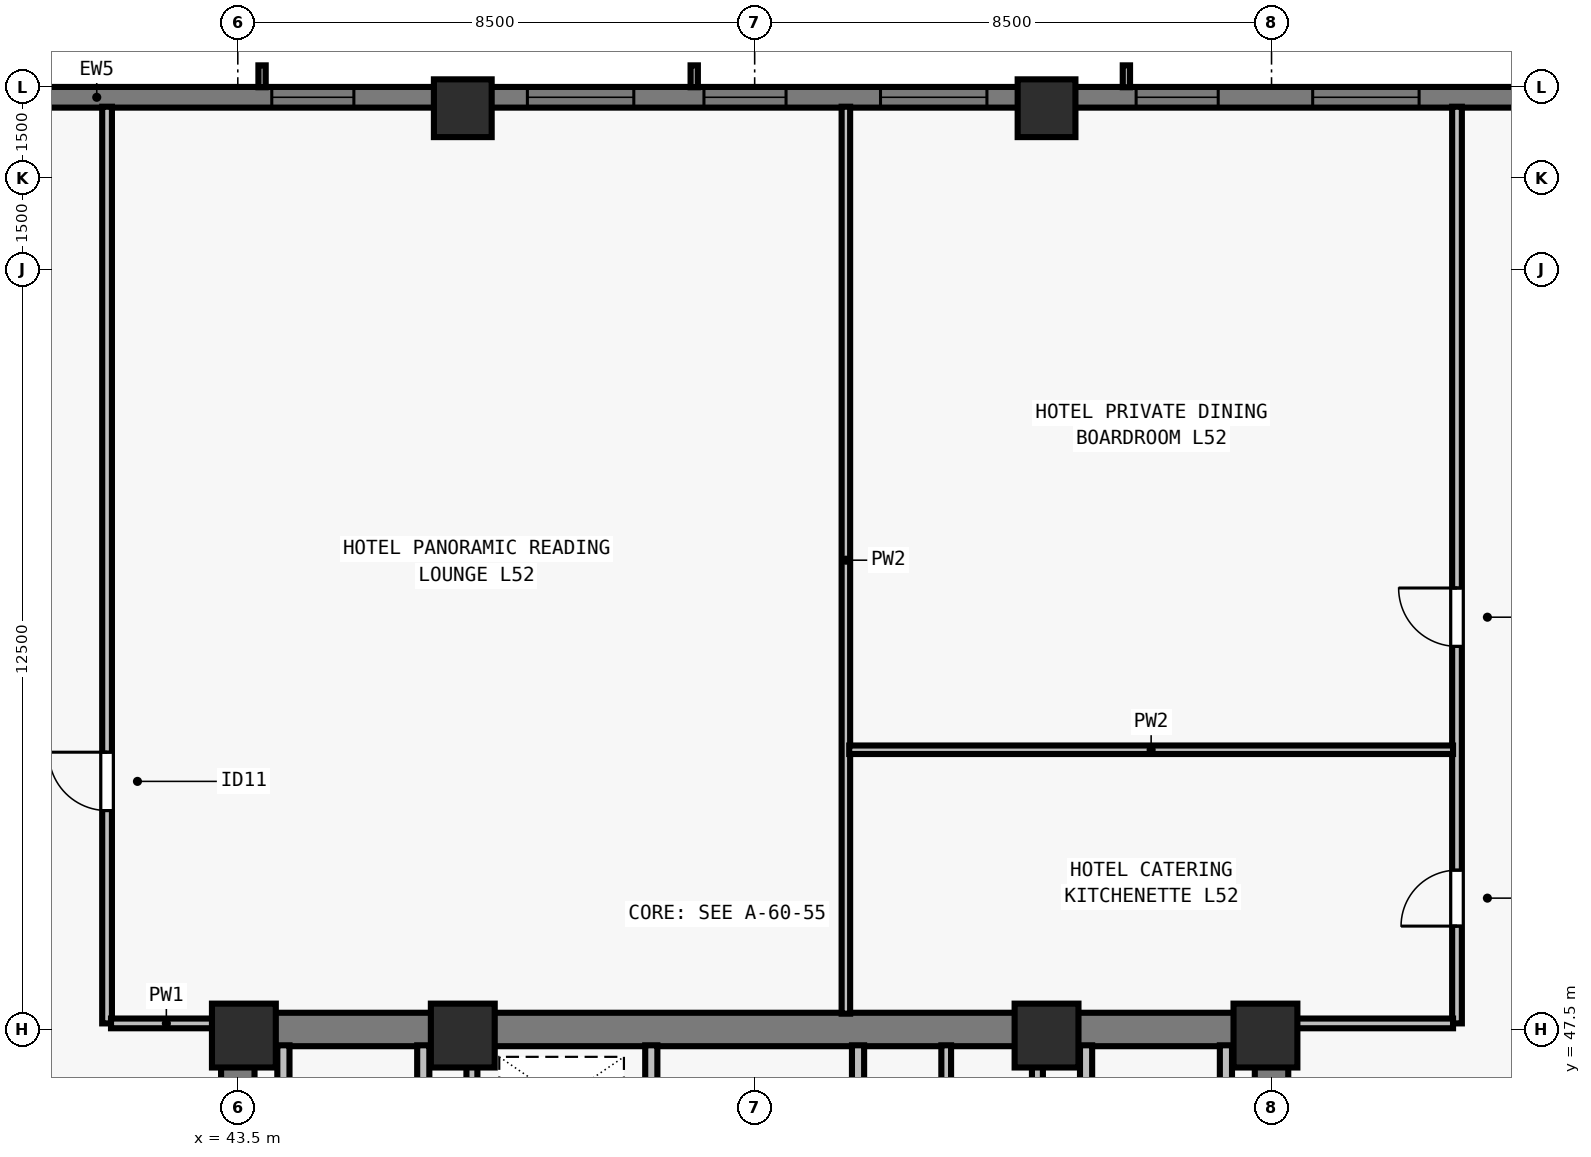
"""IFC4 building model, lengths in metres.
Left out: names, types, materials, properties, quantities, classifications, styles, units other than length and angle.
Written with IfcOpenShell. Run it as: python <this file> out.ifc"""

import sys

from ifc_helpers import new_model, si_unit, direction, frame, frame_2d, origin, origin_2d, place, context, subcontext, project, spatial, rectangle, extrude, element, fill, save


model = new_model("IFC4")
c1 = context("Model", 3, precision=1e-05, world=origin(), true_north=direction((0.0, 1.0)))
c2 = subcontext(c1, "Body", "Model", "MODEL_VIEW")
j1 = project(units=[si_unit("LENGTHUNIT", "METRE"), si_unit("PLANEANGLEUNIT", "RADIAN")], contexts=[c1])
p1 = place(None, origin())
s1 = spatial("IfcSite", under=j1, at=p1, CompositionType="ELEMENT")
p2 = place(p1, origin())
s2 = spatial("IfcBuilding", under=s1, at=p2, CompositionType="ELEMENT")
p3 = place(p2, frame((0.0, 0.0, 190.0)))
s3 = spatial("IfcBuildingStorey", under=s2, at=p3, CompositionType="ELEMENT", Elevation=190.0)
for number, where, z_axis, x_axis in (
    (1, (43.6, 47.4, 0.0), (0.0, 0.0, 1.0), (1.0, 0.0, 0.0)),
    (2, (47.2, 47.4, 0.0), (0.0, 0.0, 1.0), (1.0, 0.0, 0.0)),
    (3, (56.8, 47.4, 0.0), (0.0, 0.0, 1.0), (1.0, 0.0, 0.0)),
    (4, (60.4, 47.4, 0.0), (0.0, 0.0, 1.0), (1.0, 0.0, 0.0)),
):
    element("IfcColumn", number, at=place(p3, frame(where, z_axis=z_axis, x_axis=x_axis)), inside=s3, PredefinedType="COLUMN", context=c2, shape_type="SweptSolid", body=[
        extrude(rectangle(XDim=1.05, YDim=1.05, at=origin_2d()), origin(), (0.0, 0.0, 1.0), 3.5),
    ])
for number, where, z_axis, x_axis in (
    (5, (56.8, 62.65, 0.0), (0.0, 0.0, 1.0), (1.0, 0.0, 0.0)),
    (6, (47.2, 62.65, 0.0), (0.0, 0.0, 1.0), (1.0, 0.0, 0.0)),
):
    element("IfcColumn", number, at=place(p3, frame(where, z_axis=z_axis, x_axis=x_axis)), inside=s3, PredefinedType="COLUMN", context=c2, shape_type="SweptSolid", body=[
        extrude(rectangle(XDim=0.95, YDim=0.95, at=origin_2d()), origin(), (0.0, 0.0, 1.0), 3.5),
    ])
p4 = place(p3, frame((32.0, 62.83, 0.0), z_axis=(0.0, 0.0, 1.0), x_axis=(1.0, 0.0, 0.0)))
e7 = element("IfcWall", 7, at=p4, inside=s3, PredefinedType="SOLIDWALL", context=c2, shape_type="SweptSolid", body=[
    extrude(rectangle(XDim=39.682, YDim=0.34, at=frame_2d((19.841, 0.0))), origin(), (0.0, 0.0, 1.0), 3.24),
])
p5 = place(p4, frame((4.952, 0.0, 0.8)))
e8 = element("IfcOpeningElement", 8, at=p5, cuts=e7, PredefinedType="OPENING", context=c2, shape_type="SweptSolid", body=[
    extrude(rectangle(XDim=1.35, YDim=1.62, at=frame_2d((0.675, 0.81))), frame((0.0, 0.18, 0.0), z_axis=(0.0, -1.0, 0.0), x_axis=(1.0, 0.0, 0.0)), (0.0, 0.0, 1.0), 0.36),
])
p6 = place(p4, frame((12.059, 0.0, 0.8)))
e9 = element("IfcOpeningElement", 9, at=p6, cuts=e7, PredefinedType="OPENING", context=c2, shape_type="SweptSolid", body=[
    extrude(rectangle(XDim=1.35, YDim=1.62, at=frame_2d((0.675, 0.81))), frame((0.0, 0.18, 0.0), z_axis=(0.0, -1.0, 0.0), x_axis=(1.0, 0.0, 0.0)), (0.0, 0.0, 1.0), 0.36),
])
p7 = place(p4, frame((16.262, 0.0, 0.8)))
e10 = element("IfcOpeningElement", 10, at=p7, cuts=e7, PredefinedType="OPENING", context=c2, shape_type="SweptSolid", body=[
    extrude(rectangle(XDim=1.75, YDim=1.62, at=frame_2d((0.875, 0.81))), frame((0.0, 0.18, 0.0), z_axis=(0.0, -1.0, 0.0), x_axis=(1.0, 0.0, 0.0)), (0.0, 0.0, 1.0), 0.36),
])
p8 = place(p4, frame((19.166, 0.0, 0.8)))
e11 = element("IfcOpeningElement", 11, at=p8, cuts=e7, PredefinedType="OPENING", context=c2, shape_type="SweptSolid", body=[
    extrude(rectangle(XDim=1.35, YDim=1.62, at=frame_2d((0.675, 0.81))), frame((0.0, 0.18, 0.0), z_axis=(0.0, -1.0, 0.0), x_axis=(1.0, 0.0, 0.0)), (0.0, 0.0, 1.0), 0.36),
])
p9 = place(p4, frame((22.07, 0.0, 0.8)))
e12 = element("IfcOpeningElement", 12, at=p9, cuts=e7, PredefinedType="OPENING", context=c2, shape_type="SweptSolid", body=[
    extrude(rectangle(XDim=1.75, YDim=1.62, at=frame_2d((0.875, 0.81))), frame((0.0, 0.18, 0.0), z_axis=(0.0, -1.0, 0.0), x_axis=(1.0, 0.0, 0.0)), (0.0, 0.0, 1.0), 0.36),
])
p10 = place(p4, frame((26.273, 0.0, 0.8)))
e13 = element("IfcOpeningElement", 13, at=p10, cuts=e7, PredefinedType="OPENING", context=c2, shape_type="SweptSolid", body=[
    extrude(rectangle(XDim=1.35, YDim=1.62, at=frame_2d((0.675, 0.81))), frame((0.0, 0.18, 0.0), z_axis=(0.0, -1.0, 0.0), x_axis=(1.0, 0.0, 0.0)), (0.0, 0.0, 1.0), 0.36),
])
p11 = place(p4, frame((29.177, 0.0, 0.8)))
e14 = element("IfcOpeningElement", 14, at=p11, cuts=e7, PredefinedType="OPENING", context=c2, shape_type="SweptSolid", body=[
    extrude(rectangle(XDim=1.75, YDim=1.62, at=frame_2d((0.875, 0.81))), frame((0.0, 0.18, 0.0), z_axis=(0.0, -1.0, 0.0), x_axis=(1.0, 0.0, 0.0)), (0.0, 0.0, 1.0), 0.36),
])
p12 = place(p4, frame((34.23, 0.0, 0.8)))
e15 = element("IfcOpeningElement", 15, at=p12, cuts=e7, PredefinedType="OPENING", context=c2, shape_type="SweptSolid", body=[
    extrude(rectangle(XDim=1.35, YDim=1.62, at=frame_2d((0.675, 0.81))), frame((0.0, 0.18, 0.0), z_axis=(0.0, -1.0, 0.0), x_axis=(1.0, 0.0, 0.0)), (0.0, 0.0, 1.0), 0.36),
])
p13 = place(p3, frame((43.225, 47.5, 0.0), z_axis=(0.0, 0.0, 1.0), x_axis=(1.0, 0.0, 0.0)))
e16 = element("IfcWall", 16, at=p13, inside=s3, PredefinedType="SHEAR", context=c2, shape_type="SweptSolid", body=[
    extrude(rectangle(XDim=17.55, YDim=0.55, at=frame_2d((8.775, 0.0))), origin(), (0.0, 0.0, 1.0), 3.24),
])
for number, where, z_axis, x_axis in (
    (17, (43.5, 40.8, 0.0), (0.0, 0.0, 1.0), (0.0, 1.0, 0.0)),
    (18, (60.5, 40.8, 0.0), (0.0, 0.0, 1.0), (0.0, 1.0, 0.0)),
):
    element("IfcWall", number, at=place(p3, frame(where, z_axis=z_axis, x_axis=x_axis)), inside=s3, PredefinedType="SHEAR", context=c2, shape_type="SweptSolid", body=[
        extrude(rectangle(XDim=6.435, YDim=0.55, at=frame_2d((3.218, 0.0))), origin(), (0.0, 0.0, 1.0), 3.24),
    ])
p14 = place(p3, frame((50.3, 40.585, 0.0), z_axis=(0.0, 0.0, 1.0), x_axis=(0.0, 1.0, 0.0)))
e19 = element("IfcWall", 19, at=p14, inside=s3, PredefinedType="SOLIDWALL", context=c2, shape_type="SweptSolid", body=[
    extrude(rectangle(XDim=6.655, YDim=0.2, at=frame_2d((3.328, 0.0))), origin(), (0.0, 0.0, 1.0), 3.24),
])
p15 = place(p14, frame((5.065, 0.0, 0.0)))
e20 = element("IfcOpeningElement", 20, at=p15, cuts=e19, PredefinedType="OPENING", context=c2, shape_type="SweptSolid", body=[
    extrude(rectangle(XDim=0.8, YDim=2.08, at=frame_2d((0.4, 1.04))), frame((0.0, 0.11, 0.0), z_axis=(0.0, -1.0, 0.0), x_axis=(1.0, 0.0, 0.0)), (0.0, 0.0, 1.0), 0.22),
])
p16 = place(p3, frame((53.7, 40.585, 0.0), z_axis=(0.0, 0.0, 1.0), x_axis=(0.0, 1.0, 0.0)))
e21 = element("IfcWall", 21, at=p16, inside=s3, PredefinedType="SOLIDWALL", context=c2, shape_type="SweptSolid", body=[
    extrude(rectangle(XDim=6.655, YDim=0.2, at=frame_2d((3.328, 0.0))), origin(), (0.0, 0.0, 1.0), 3.24),
])
p17 = place(p16, frame((0.195, 0.0, 0.0)))
e22 = element("IfcOpeningElement", 22, at=p17, cuts=e21, PredefinedType="OPENING", context=c2, shape_type="SweptSolid", body=[
    extrude(rectangle(XDim=0.8, YDim=2.08, at=frame_2d((0.4, 1.04))), frame((0.0, 0.11, 0.0), z_axis=(0.0, -1.0, 0.0), x_axis=(1.0, 0.0, 0.0)), (0.0, 0.0, 1.0), 0.22),
])
p18 = place(p16, frame((4.265, 0.0, 0.0)))
e23 = element("IfcOpeningElement", 23, at=p18, cuts=e21, PredefinedType="OPENING", context=c2, shape_type="SweptSolid", body=[
    extrude(rectangle(XDim=0.95, YDim=2.12, at=frame_2d((0.475, 1.06))), frame((0.0, 0.11, 0.0), z_axis=(0.0, -1.0, 0.0), x_axis=(1.0, 0.0, 0.0)), (0.0, 0.0, 1.0), 0.22),
])
for number, where, z_axis, x_axis in (
    (24, (46.55, 43.735, 0.0), (0.0, 0.0, 1.0), (0.0, 1.0, 0.0)),
    (25, (44.25, 43.735, 0.0), (0.0, 0.0, 1.0), (0.0, 1.0, 0.0)),
    (26, (57.45, 43.735, 0.0), (0.0, 0.0, 1.0), (0.0, 1.0, 0.0)),
    (27, (59.75, 43.735, 0.0), (0.0, 0.0, 1.0), (0.0, 1.0, 0.0)),
):
    element("IfcWall", number, at=place(p3, frame(where, z_axis=z_axis, x_axis=x_axis)), inside=s3, PredefinedType="SOLIDWALL", context=c2, shape_type="SweptSolid", body=[
        extrude(rectangle(XDim=3.505, YDim=0.2, at=frame_2d((1.752, 0.0))), origin(), (0.0, 0.0, 1.0), 3.24),
    ])
for number, where, z_axis, x_axis in (
    (28, (47.35, 43.735, 0.0), (0.0, 0.0, 1.0), (0.0, 1.0, 0.0)),
    (29, (56.65, 43.735, 0.0), (0.0, 0.0, 1.0), (0.0, 1.0, 0.0)),
):
    element("IfcWall", number, at=place(p3, frame(where, z_axis=z_axis, x_axis=x_axis)), inside=s3, PredefinedType="SOLIDWALL", context=c2, shape_type="SweptSolid", body=[
        extrude(rectangle(XDim=3.505, YDim=0.18, at=frame_2d((1.752, 0.0))), origin(), (0.0, 0.0, 1.0), 3.24),
    ])
p19 = place(p3, frame((55.15, 44.195, 0.0), z_axis=(0.0, 0.0, 1.0), x_axis=(0.0, 1.0, 0.0)))
e30 = element("IfcWall", 30, at=p19, inside=s3, PredefinedType="PARTITIONING", context=c2, shape_type="SweptSolid", body=[
    extrude(rectangle(XDim=3.045, YDim=0.16, at=frame_2d((1.522, 0.0))), origin(), (0.0, 0.0, 1.0), 3.24),
])
p20 = place(p19, frame((1.025, 0.0, 0.0)))
e31 = element("IfcOpeningElement", 31, at=p20, cuts=e30, PredefinedType="OPENING", context=c2, shape_type="SweptSolid", body=[
    extrude(rectangle(XDim=0.8, YDim=2.1, at=frame_2d((0.4, 1.05))), frame((0.0, 0.09, 0.0), z_axis=(0.0, -1.0, 0.0), x_axis=(1.0, 0.0, 0.0)), (0.0, 0.0, 1.0), 0.18),
])
p21 = place(p3, frame((41.35, 47.6, 0.0), z_axis=(0.0, 0.0, 1.0), x_axis=(0.0, 1.0, 0.0)))
e32 = element("IfcWall", 32, at=p21, inside=s3, PredefinedType="PARTITIONING", context=c2, shape_type="SweptSolid", body=[
    extrude(rectangle(XDim=15.075, YDim=0.16, at=frame_2d((7.538, 0.0))), origin(), (0.0, 0.0, 1.0), 2.515),
])
p22 = place(p21, frame((3.5, 0.0, 0.0)))
e33 = element("IfcOpeningElement", 33, at=p22, cuts=e32, PredefinedType="OPENING", context=c2, shape_type="SweptSolid", body=[
    extrude(rectangle(XDim=0.96, YDim=2.12, at=frame_2d((0.48, 1.06))), frame((0.0, 0.09, 0.0), z_axis=(0.0, -1.0, 0.0), x_axis=(1.0, 0.0, 0.0)), (0.0, 0.0, 1.0), 0.18),
])
p23 = place(p3, frame((41.415, 47.6, 0.0), z_axis=(0.0, 0.0, 1.0), x_axis=(1.0, 0.0, 0.0)))
e34 = element("IfcWall", 34, at=p23, inside=s3, PredefinedType="PARTITIONING", context=c2, shape_type="SweptSolid", body=[
    extrude(rectangle(XDim=1.82, YDim=0.16, at=frame_2d((0.91, 0.0))), origin(), (0.0, 0.0, 1.0), 3.24),
])
p24 = place(p3, frame((63.55, 47.6, 0.0), z_axis=(0.0, 0.0, 1.0), x_axis=(0.0, 1.0, 0.0)))
e35 = element("IfcWall", 35, at=p24, inside=s3, PredefinedType="PARTITIONING", context=c2, shape_type="SweptSolid", body=[
    extrude(rectangle(XDim=15.075, YDim=0.16, at=frame_2d((7.538, 0.0))), origin(), (0.0, 0.0, 1.0), 2.515),
])
p25 = place(p24, frame((1.6, 0.0, 0.0)))
e36 = element("IfcOpeningElement", 36, at=p25, cuts=e35, PredefinedType="OPENING", context=c2, shape_type="SweptSolid", body=[
    extrude(rectangle(XDim=0.92, YDim=2.12, at=frame_2d((0.46, 1.06))), frame((0.0, 0.09, 0.0), z_axis=(0.0, -1.0, 0.0), x_axis=(1.0, 0.0, 0.0)), (0.0, 0.0, 1.0), 0.18),
])
p26 = place(p24, frame((6.2, 0.0, 0.0)))
e37 = element("IfcOpeningElement", 37, at=p26, cuts=e35, PredefinedType="OPENING", context=c2, shape_type="SweptSolid", body=[
    extrude(rectangle(XDim=0.96, YDim=2.12, at=frame_2d((0.48, 1.06))), frame((0.0, 0.09, 0.0), z_axis=(0.0, -1.0, 0.0), x_axis=(1.0, 0.0, 0.0)), (0.0, 0.0, 1.0), 0.18),
])
p27 = place(p3, frame((60.765, 47.6, 0.0), z_axis=(0.0, 0.0, 1.0), x_axis=(1.0, 0.0, 0.0)))
e38 = element("IfcWall", 38, at=p27, inside=s3, PredefinedType="PARTITIONING", context=c2, shape_type="SweptSolid", body=[
    extrude(rectangle(XDim=2.72, YDim=0.16, at=frame_2d((1.36, 0.0))), origin(), (0.0, 0.0, 1.0), 3.24),
])
p28 = place(p3, frame((53.5, 47.76, 0.0), z_axis=(0.0, 0.0, 1.0), x_axis=(0.0, 1.0, 0.0)))
e39 = element("IfcWall", 39, at=p28, inside=s3, PredefinedType="PARTITIONING", context=c2, shape_type="SweptSolid", body=[
    extrude(rectangle(XDim=14.915, YDim=0.14, at=frame_2d((7.458, 0.0))), origin(), (0.0, 0.0, 1.0), 2.856),
])
p29 = place(p3, frame((53.555, 52.1, 0.0), z_axis=(0.0, 0.0, 1.0), x_axis=(1.0, 0.0, 0.0)))
e40 = element("IfcWall", 40, at=p29, inside=s3, PredefinedType="PARTITIONING", context=c2, shape_type="SweptSolid", body=[
    extrude(rectangle(XDim=9.93, YDim=0.14, at=frame_2d((4.965, 0.0))), origin(), (0.0, 0.0, 1.0), 3.24),
])
p30 = place(p6, origin())
e41 = element("IfcWindow", 41, at=p30, inside=s3, PartitioningType="SINGLE_PANEL", PredefinedType="WINDOW", context=c2, shape_type="SweptSolid", body=[
    extrude(rectangle(XDim=1.35, YDim=1.62, at=frame_2d((0.675, 0.81))), frame((0.0, -0.05, 0.0), z_axis=(0.0, -1.0, 0.0), x_axis=(1.0, 0.0, 0.0)), (0.0, 0.0, 1.0), 0.06),
])
fill(e9, e41)
p31 = place(p7, origin())
e42 = element("IfcWindow", 42, at=p31, inside=s3, PartitioningType="SINGLE_PANEL", PredefinedType="WINDOW", context=c2, shape_type="SweptSolid", body=[
    extrude(rectangle(XDim=1.75, YDim=1.62, at=frame_2d((0.875, 0.81))), frame((0.0, -0.05, 0.0), z_axis=(0.0, -1.0, 0.0), x_axis=(1.0, 0.0, 0.0)), (0.0, 0.0, 1.0), 0.06),
])
fill(e10, e42)
p32 = place(p8, origin())
e43 = element("IfcWindow", 43, at=p32, inside=s3, PartitioningType="SINGLE_PANEL", PredefinedType="WINDOW", context=c2, shape_type="SweptSolid", body=[
    extrude(rectangle(XDim=1.35, YDim=1.62, at=frame_2d((0.675, 0.81))), frame((0.0, -0.05, 0.0), z_axis=(0.0, -1.0, 0.0), x_axis=(1.0, 0.0, 0.0)), (0.0, 0.0, 1.0), 0.06),
])
fill(e11, e43)
p33 = place(p9, origin())
e44 = element("IfcWindow", 44, at=p33, inside=s3, PartitioningType="SINGLE_PANEL", PredefinedType="WINDOW", context=c2, shape_type="SweptSolid", body=[
    extrude(rectangle(XDim=1.75, YDim=1.62, at=frame_2d((0.875, 0.81))), frame((0.0, -0.05, 0.0), z_axis=(0.0, -1.0, 0.0), x_axis=(1.0, 0.0, 0.0)), (0.0, 0.0, 1.0), 0.06),
])
fill(e12, e44)
p34 = place(p10, origin())
e45 = element("IfcWindow", 45, at=p34, inside=s3, PartitioningType="SINGLE_PANEL", PredefinedType="WINDOW", context=c2, shape_type="SweptSolid", body=[
    extrude(rectangle(XDim=1.35, YDim=1.62, at=frame_2d((0.675, 0.81))), frame((0.0, -0.05, 0.0), z_axis=(0.0, -1.0, 0.0), x_axis=(1.0, 0.0, 0.0)), (0.0, 0.0, 1.0), 0.06),
])
fill(e13, e45)
p35 = place(p11, origin())
e46 = element("IfcWindow", 46, at=p35, inside=s3, PartitioningType="SINGLE_PANEL", PredefinedType="WINDOW", context=c2, shape_type="SweptSolid", body=[
    extrude(rectangle(XDim=1.75, YDim=1.62, at=frame_2d((0.875, 0.81))), frame((0.0, -0.05, 0.0), z_axis=(0.0, -1.0, 0.0), x_axis=(1.0, 0.0, 0.0)), (0.0, 0.0, 1.0), 0.06),
])
fill(e14, e46)
p36 = place(p22, origin())
e47 = element("IfcDoor", 47, at=p36, inside=s3, OperationType="SINGLE_SWING_RIGHT", PredefinedType="DOOR", context=c2, shape_type="SweptSolid", body=[
    extrude(rectangle(XDim=0.96, YDim=2.12, at=frame_2d((0.48, 1.06))), frame((0.0, 0.025, 0.0), z_axis=(0.0, -1.0, 0.0), x_axis=(1.0, 0.0, 0.0)), (0.0, 0.0, 1.0), 0.05),
])
fill(e33, e47)
p37 = place(p25, origin())
e48 = element("IfcDoor", 48, at=p37, inside=s3, OperationType="SINGLE_SWING_LEFT", PredefinedType="DOOR", context=c2, shape_type="SweptSolid", body=[
    extrude(rectangle(XDim=0.92, YDim=2.12, at=frame_2d((0.46, 1.06))), frame((0.0, 0.025, 0.0), z_axis=(0.0, -1.0, 0.0), x_axis=(1.0, 0.0, 0.0)), (0.0, 0.0, 1.0), 0.05),
])
fill(e36, e48)
p38 = place(p26, origin())
e49 = element("IfcDoor", 49, at=p38, inside=s3, OperationType="SINGLE_SWING_RIGHT", PredefinedType="DOOR", context=c2, shape_type="SweptSolid", body=[
    extrude(rectangle(XDim=0.96, YDim=2.12, at=frame_2d((0.48, 1.06))), frame((0.0, 0.025, 0.0), z_axis=(0.0, -1.0, 0.0), x_axis=(1.0, 0.0, 0.0)), (0.0, 0.0, 1.0), 0.05),
])
fill(e37, e49)
save(model, sys.argv[1])
